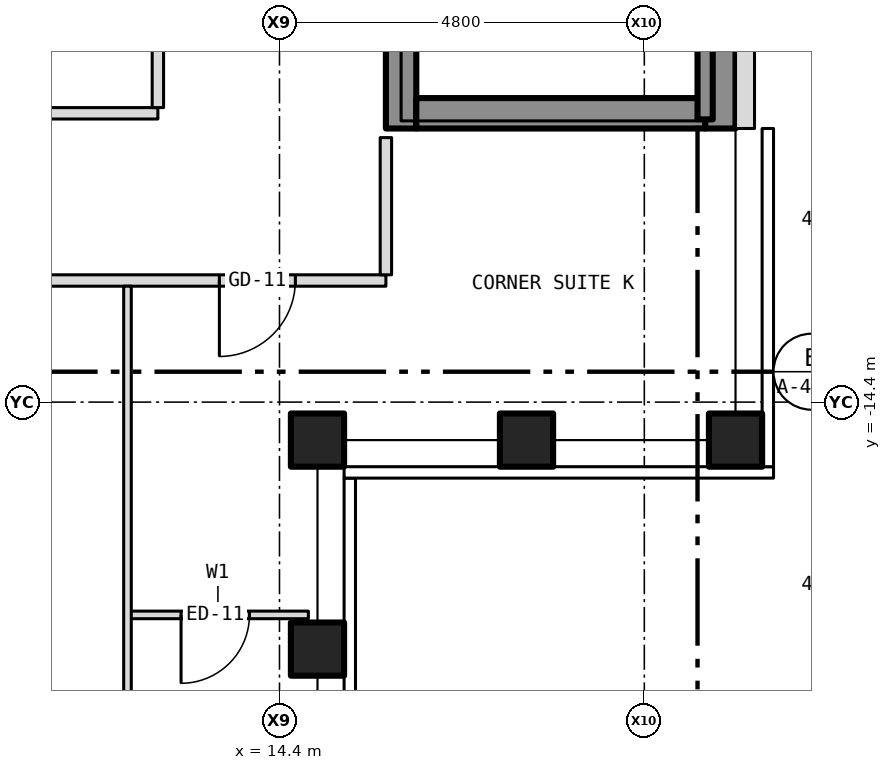
"""IFC4 building model, lengths in metres.
Left out: names, types, materials, properties, quantities, classifications, styles, units other than length and angle.
Written with IfcOpenShell. Run it as: python <this file> out.ifc"""

import sys

from ifc_helpers import new_model, si_unit, direction, frame, frame_2d, origin, origin_2d, place, context, subcontext, project, spatial, rectangle, hollow_rectangle, extrude, element, fill, save


model = new_model("IFC4")
c1 = context("Model", 3, precision=1e-05, world=origin(), true_north=direction((0.0, 1.0)))
c2 = subcontext(c1, "Body", "Model", "MODEL_VIEW")
j1 = project(units=[si_unit("LENGTHUNIT", "METRE"), si_unit("PLANEANGLEUNIT", "RADIAN")], contexts=[c1])
p1 = place(None, origin())
s1 = spatial("IfcSite", under=j1, at=p1, CompositionType="ELEMENT")
p2 = place(p1, origin())
s2 = spatial("IfcBuilding", under=s1, at=p2, CompositionType="ELEMENT")
p3 = place(p2, frame((0.0, 0.0, 201.5)))
s3 = spatial("IfcBuildingStorey", under=s2, at=p3, CompositionType="ELEMENT", Elevation=201.5)
for number, where, z_axis, x_axis in (
    (1, (20.4, -14.9, -0.15), (0.0, 0.0, 1.0), (1.0, 0.0, 0.0)),
    (2, (14.9, -14.9, -0.15), (0.0, 0.0, 1.0), (1.0, 0.0, 0.0)),
    (3, (14.9, -17.65, -0.15), (0.0, 0.0, 1.0), (1.0, 0.0, 0.0)),
    (4, (17.65, -14.9, -0.15), (0.0, 0.0, 1.0), (1.0, 0.0, 0.0)),
):
    element("IfcColumn", number, at=place(p3, frame(where, z_axis=z_axis, x_axis=x_axis)), inside=s3, PredefinedType="COLUMN", context=c2, shape_type="SweptSolid", body=[
        extrude(hollow_rectangle(XDim=0.7, YDim=0.7, WallThickness=0.04, at=origin_2d()), origin(), (0.0, 0.0, 1.0), 3.5),
    ])
p4 = place(p3, frame((16.0, -10.8, 0.0), z_axis=(0.0, 0.0, 1.0), x_axis=(0.0, 1.0, 0.0)))
e5 = element("IfcWall", 5, at=p4, inside=s3, PredefinedType="SHEAR", context=c2, shape_type="SweptSolid", body=[
    extrude(rectangle(XDim=21.6, YDim=0.4, at=frame_2d((10.8, 0.0))), origin(), (0.0, 0.0, 1.0), 3.25),
])
p5 = place(p4, frame((9.4, 0.0, 0.0)))
e6 = element("IfcOpeningElement", 6, at=p5, cuts=e5, PredefinedType="OPENING", context=c2, shape_type="SweptSolid", body=[
    extrude(rectangle(XDim=1.1, YDim=2.1, at=frame_2d((0.55, 1.05))), frame((0.0, 0.212, 0.0), z_axis=(0.0, -1.0, 0.0), x_axis=(1.0, 0.0, 0.0)), (0.0, 0.0, 1.0), 0.424),
])
p6 = place(p4, frame((11.5, 0.0, 0.0)))
e7 = element("IfcOpeningElement", 7, at=p6, cuts=e5, PredefinedType="OPENING", context=c2, shape_type="SweptSolid", body=[
    extrude(rectangle(XDim=1.1, YDim=2.1, at=frame_2d((0.55, 1.05))), frame((0.0, 0.212, 0.0), z_axis=(0.0, -1.0, 0.0), x_axis=(1.0, 0.0, 0.0)), (0.0, 0.0, 1.0), 0.424),
])
p7 = place(p4, frame((13.6, 0.0, 0.0)))
e8 = element("IfcOpeningElement", 8, at=p7, cuts=e5, PredefinedType="OPENING", context=c2, shape_type="SweptSolid", body=[
    extrude(rectangle(XDim=1.1, YDim=2.1, at=frame_2d((0.55, 1.05))), frame((0.0, 0.212, 0.0), z_axis=(0.0, -1.0, 0.0), x_axis=(1.0, 0.0, 0.0)), (0.0, 0.0, 1.0), 0.424),
])
p8 = place(p4, frame((15.7, 0.0, 0.0)))
e9 = element("IfcOpeningElement", 9, at=p8, cuts=e5, PredefinedType="OPENING", context=c2, shape_type="SweptSolid", body=[
    extrude(rectangle(XDim=1.1, YDim=2.1, at=frame_2d((0.55, 1.05))), frame((0.0, 0.212, 0.0), z_axis=(0.0, -1.0, 0.0), x_axis=(1.0, 0.0, 0.0)), (0.0, 0.0, 1.0), 0.424),
])
p9 = place(p4, frame((17.8, 0.0, 0.0)))
e10 = element("IfcOpeningElement", 10, at=p9, cuts=e5, PredefinedType="OPENING", context=c2, shape_type="SweptSolid", body=[
    extrude(rectangle(XDim=1.1, YDim=2.1, at=frame_2d((0.55, 1.05))), frame((0.0, 0.212, 0.0), z_axis=(0.0, -1.0, 0.0), x_axis=(1.0, 0.0, 0.0)), (0.0, 0.0, 1.0), 0.424),
])
p10 = place(p4, frame((5.642, 0.0, 0.0)))
e11 = element("IfcOpeningElement", 11, at=p10, cuts=e5, PredefinedType="OPENING", context=c2, shape_type="SweptSolid", body=[
    extrude(rectangle(XDim=1.1, YDim=2.1, at=frame_2d((0.55, 1.05))), frame((0.0, 0.212, 0.0), z_axis=(0.0, -1.0, 0.0), x_axis=(1.0, 0.0, 0.0)), (0.0, 0.0, 1.0), 0.424),
])
p11 = place(p4, frame((7.5, 0.0, 0.0)))
e12 = element("IfcOpeningElement", 12, at=p11, cuts=e5, PredefinedType="OPENING", context=c2, shape_type="SweptSolid", body=[
    extrude(rectangle(XDim=1.1, YDim=2.1, at=frame_2d((0.55, 1.05))), frame((0.0, 0.212, 0.0), z_axis=(0.0, -1.0, 0.0), x_axis=(1.0, 0.0, 0.0)), (0.0, 0.0, 1.0), 0.424),
])
p12 = place(p4, frame((20.0, 0.0, 0.0)))
e13 = element("IfcOpeningElement", 13, at=p12, cuts=e5, PredefinedType="OPENING", context=c2, shape_type="SweptSolid", body=[
    extrude(rectangle(XDim=0.9, YDim=2.1, at=frame_2d((0.45, 1.05))), frame((0.0, 0.212, 0.0), z_axis=(0.0, -1.0, 0.0), x_axis=(1.0, 0.0, 0.0)), (0.0, 0.0, 1.0), 0.424),
])
p13 = place(p3, frame((20.2, -10.8, 0.0), z_axis=(0.0, 0.0, 1.0), x_axis=(0.0, 1.0, 0.0)))
e14 = element("IfcWall", 14, at=p13, inside=s3, PredefinedType="SHEAR", context=c2, shape_type="SweptSolid", body=[
    extrude(rectangle(XDim=21.6, YDim=0.4, at=frame_2d((10.8, 0.0))), origin(), (0.0, 0.0, 1.0), 3.25),
])
p14 = place(p3, frame((16.2, -10.6, 0.0), z_axis=(0.0, 0.0, 1.0), x_axis=(1.0, 0.0, 0.0)))
e15 = element("IfcWall", 15, at=p14, inside=s3, PredefinedType="SHEAR", context=c2, shape_type="SweptSolid", body=[
    extrude(rectangle(XDim=3.8, YDim=0.4, at=frame_2d((1.9, 0.0))), origin(), (0.0, 0.0, 1.0), 3.25),
])
p15 = place(p3, frame((20.525, -10.8, 0.0), z_axis=(0.0, 0.0, 1.0), x_axis=(0.0, 1.0, 0.0)))
e16 = element("IfcWall", 16, at=p15, inside=s3, PredefinedType="SOLIDWALL", context=c2, shape_type="SweptSolid", body=[
    extrude(rectangle(XDim=21.6, YDim=0.25, at=frame_2d((10.8, 0.0))), origin(), (0.0, 0.0, 1.0), 3.5),
])
p16 = place(p15, frame((2.95, 0.0, 1.0)))
e17 = element("IfcOpeningElement", 17, at=p16, cuts=e16, PredefinedType="OPENING", context=c2, shape_type="SweptSolid", body=[
    extrude(rectangle(XDim=0.6, YDim=1.5, at=frame_2d((0.3, 0.75))), frame((0.0, 0.137, 0.0), z_axis=(0.0, -1.0, 0.0), x_axis=(1.0, 0.0, 0.0)), (0.0, 0.0, 1.0), 0.274),
])
p17 = place(p3, frame((12.4, -17.2, 0.0), z_axis=(0.0, 0.0, 1.0), x_axis=(1.0, 0.0, 0.0)))
e18 = element("IfcWall", 18, at=p17, inside=s3, PredefinedType="PARTITIONING", context=c2, shape_type="SweptSolid", body=[
    extrude(rectangle(XDim=2.38, YDim=0.1, at=frame_2d((1.19, 0.0))), origin(), (0.0, 0.0, 1.0), 3.35),
])
p18 = place(p17, frame((0.705, 0.0, 0.0)))
e19 = element("IfcOpeningElement", 19, at=p18, cuts=e18, PredefinedType="OPENING", context=c2, shape_type="SweptSolid", body=[
    extrude(rectangle(XDim=0.9, YDim=2.1, at=frame_2d((0.45, 1.05))), frame((0.0, 0.062, 0.0), z_axis=(0.0, -1.0, 0.0), x_axis=(1.0, 0.0, 0.0)), (0.0, 0.0, 1.0), 0.124),
])
p19 = place(p3, frame((-15.8, -12.8, 0.0), z_axis=(0.0, 0.0, 1.0), x_axis=(1.0, 0.0, 0.0)))
e20 = element("IfcWall", 20, at=p19, inside=s3, PredefinedType="PARTITIONING", context=c2, shape_type="SweptSolid", body=[
    extrude(rectangle(XDim=31.6, YDim=0.15, at=frame_2d((15.8, 0.0))), origin(), (0.0, 0.0, 1.0), 3.35),
])
p20 = place(p19, frame((6.466, 0.0, 0.0)))
e21 = element("IfcOpeningElement", 21, at=p20, cuts=e20, PredefinedType="OPENING", context=c2, shape_type="SweptSolid", body=[
    extrude(rectangle(XDim=1.0, YDim=2.1, at=frame_2d((0.5, 1.05))), frame((0.0, 0.087, 0.0), z_axis=(0.0, -1.0, 0.0), x_axis=(1.0, 0.0, 0.0)), (0.0, 0.0, 1.0), 0.174),
])
p21 = place(p19, frame((11.434, 0.0, 0.0)))
e22 = element("IfcOpeningElement", 22, at=p21, cuts=e20, PredefinedType="OPENING", context=c2, shape_type="SweptSolid", body=[
    extrude(rectangle(XDim=1.0, YDim=2.1, at=frame_2d((0.5, 1.05))), frame((0.0, 0.087, 0.0), z_axis=(0.0, -1.0, 0.0), x_axis=(1.0, 0.0, 0.0)), (0.0, 0.0, 1.0), 0.174),
])
p22 = place(p19, frame((15.442, 0.0, 0.0)))
e23 = element("IfcOpeningElement", 23, at=p22, cuts=e20, PredefinedType="OPENING", context=c2, shape_type="SweptSolid", body=[
    extrude(rectangle(XDim=1.0, YDim=2.1, at=frame_2d((0.5, 1.05))), frame((0.0, 0.087, 0.0), z_axis=(0.0, -1.0, 0.0), x_axis=(1.0, 0.0, 0.0)), (0.0, 0.0, 1.0), 0.174),
])
p23 = place(p19, frame((25.092, 0.0, 0.0)))
e24 = element("IfcOpeningElement", 24, at=p23, cuts=e20, PredefinedType="OPENING", context=c2, shape_type="SweptSolid", body=[
    extrude(rectangle(XDim=1.0, YDim=2.1, at=frame_2d((0.5, 1.05))), frame((0.0, 0.087, 0.0), z_axis=(0.0, -1.0, 0.0), x_axis=(1.0, 0.0, 0.0)), (0.0, 0.0, 1.0), 0.174),
])
p24 = place(p19, frame((1.192, 0.0, 0.0)))
e25 = element("IfcOpeningElement", 25, at=p24, cuts=e20, PredefinedType="OPENING", context=c2, shape_type="SweptSolid", body=[
    extrude(rectangle(XDim=1.0, YDim=2.1, at=frame_2d((0.5, 1.05))), frame((0.0, 0.087, 0.0), z_axis=(0.0, -1.0, 0.0), x_axis=(1.0, 0.0, 0.0)), (0.0, 0.0, 1.0), 0.174),
])
p25 = place(p19, frame((29.409, 0.0, 0.0)))
e26 = element("IfcOpeningElement", 26, at=p25, cuts=e20, PredefinedType="OPENING", context=c2, shape_type="SweptSolid", body=[
    extrude(rectangle(XDim=1.0, YDim=2.1, at=frame_2d((0.5, 1.05))), frame((0.0, 0.087, 0.0), z_axis=(0.0, -1.0, 0.0), x_axis=(1.0, 0.0, 0.0)), (0.0, 0.0, 1.0), 0.174),
])
p26 = place(p3, frame((6.3, -10.6, 0.0), z_axis=(0.0, 0.0, 1.0), x_axis=(1.0, 0.0, 0.0)))
e27 = element("IfcWall", 27, at=p26, inside=s3, PredefinedType="PARTITIONING", context=c2, shape_type="SweptSolid", body=[
    extrude(rectangle(XDim=6.5, YDim=0.15, at=frame_2d((3.25, 0.0))), origin(), (0.0, 0.0, 1.0), 3.35),
])
p27 = place(p3, frame((12.4, -20.78, 0.0), z_axis=(0.0, 0.0, 1.0), x_axis=(0.0, 1.0, 0.0)))
e28 = element("IfcWall", 28, at=p27, inside=s3, PredefinedType="PARTITIONING", context=c2, shape_type="SweptSolid", body=[
    extrude(rectangle(XDim=7.905, YDim=0.1, at=frame_2d((3.953, 0.0))), origin(), (0.0, 0.0, 1.0), 3.35),
])
p28 = place(p3, frame((12.8, -10.525, 0.0), z_axis=(0.0, 0.0, 1.0), x_axis=(0.0, 1.0, 0.0)))
e29 = element("IfcWall", 29, at=p28, inside=s3, PredefinedType="PARTITIONING", context=c2, shape_type="SweptSolid", body=[
    extrude(rectangle(XDim=8.525, YDim=0.15, at=frame_2d((4.262, 0.0))), origin(), (0.0, 0.0, 1.0), 3.35),
])
p29 = place(p3, frame((15.8, -12.725, 0.0), z_axis=(0.0, 0.0, 1.0), x_axis=(0.0, 1.0, 0.0)))
e30 = element("IfcWall", 30, at=p29, inside=s3, PredefinedType="PARTITIONING", context=c2, shape_type="SweptSolid", body=[
    extrude(rectangle(XDim=1.805, YDim=0.15, at=frame_2d((0.903, 0.0))), origin(), (0.0, 0.0, 1.0), 3.35),
])
p30 = place(p3, frame((20.0, -10.68, 0.0), z_axis=(0.0, 0.0, 1.0), x_axis=(0.0, 1.0, 0.0)))
e31 = element("IfcWall", 31, at=p30, inside=s3, PredefinedType="SHEAR", context=c2, shape_type="SweptSolid", body=[
    extrude(rectangle(XDim=6.98, YDim=0.2, at=frame_2d((3.49, 0.0))), origin(), (0.0, 0.0, 1.0), 3.25),
])
p31 = place(p18, origin())
e32 = element("IfcDoor", 32, at=p31, inside=s3, OperationType="SINGLE_SWING_LEFT", PredefinedType="DOOR", context=c2, shape_type="SweptSolid", body=[
    extrude(rectangle(XDim=0.9, YDim=2.1, at=frame_2d((0.45, 1.05))), frame((0.0, 0.025, 0.0), z_axis=(0.0, -1.0, 0.0), x_axis=(1.0, 0.0, 0.0)), (0.0, 0.0, 1.0), 0.05),
])
fill(e19, e32)
p32 = place(p25, origin())
e33 = element("IfcDoor", 33, at=p32, inside=s3, OperationType="SINGLE_SWING_LEFT", PredefinedType="DOOR", context=c2, shape_type="SweptSolid", body=[
    extrude(rectangle(XDim=1.0, YDim=2.1, at=frame_2d((0.5, 1.05))), frame((0.0, 0.025, 0.0), z_axis=(0.0, -1.0, 0.0), x_axis=(1.0, 0.0, 0.0)), (0.0, 0.0, 1.0), 0.05),
])
fill(e26, e33)
save(model, sys.argv[1])
